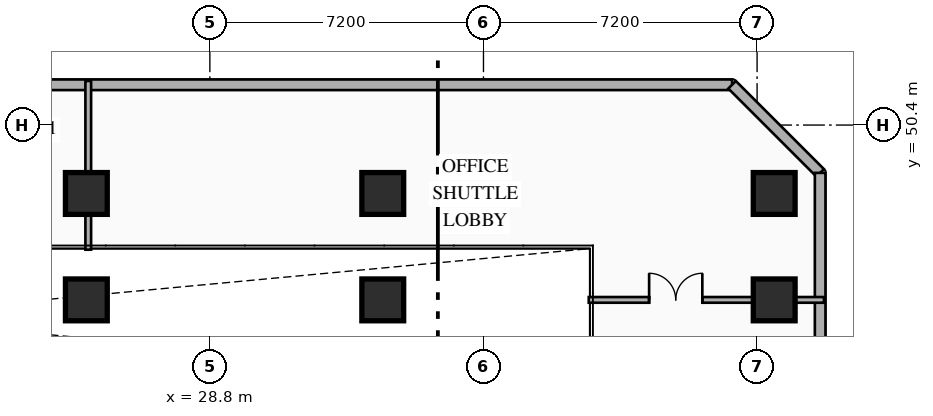
"""IFC4 building model, lengths in metres.
Left out: names, types, materials, properties, quantities, classifications, styles, units other than length and angle.
Written with IfcOpenShell. Run it as: python <this file> out.ifc"""

import sys

from ifc_helpers import new_model, si_unit, direction, frame, frame_2d, origin, origin_2d, place, context, subcontext, project, spatial, rectangle, hollow_rectangle, extrude, element, fill, save


model = new_model("IFC4")
c1 = context("Model", 3, precision=1e-05, world=origin(), true_north=direction((0.0, 1.0)))
c2 = subcontext(c1, "Body", "Model", "MODEL_VIEW")
j1 = project(units=[si_unit("LENGTHUNIT", "METRE"), si_unit("PLANEANGLEUNIT", "RADIAN")], contexts=[c1])
p1 = place(None, origin())
s1 = spatial("IfcSite", under=j1, at=p1, CompositionType="ELEMENT")
p2 = place(p1, origin())
s2 = spatial("IfcBuilding", under=s1, at=p2, CompositionType="ELEMENT")
p3 = place(p2, origin())
s3 = spatial("IfcBuildingStorey", under=s2, at=p3, CompositionType="ELEMENT", Elevation=0.0)
for number, where, z_axis, x_axis in (
    (1, (25.55, 45.8, 0.0), (0.0, 0.0, 1.0), (1.0, 0.0, 0.0)),
    (2, (33.35, 45.8, 0.0), (0.0, 0.0, 1.0), (1.0, 0.0, 0.0)),
    (3, (43.65, 45.8, 0.0), (0.0, 0.0, 1.0), (1.0, 0.0, 0.0)),
    (4, (25.55, 48.6, 0.0), (0.0, 0.0, 1.0), (1.0, 0.0, 0.0)),
    (5, (33.35, 48.6, 0.0), (0.0, 0.0, 1.0), (1.0, 0.0, 0.0)),
    (6, (43.65, 48.6, 0.0), (0.0, 0.0, 1.0), (1.0, 0.0, 0.0)),
):
    element("IfcColumn", number, at=place(p3, frame(where, z_axis=z_axis, x_axis=x_axis)), inside=s3, PredefinedType="COLUMN", context=c2, shape_type="SweptSolid", body=[
        extrude(hollow_rectangle(XDim=1.1, YDim=1.1, WallThickness=0.04, at=origin_2d()), origin(), (0.0, 0.0, 1.0), 5.4),
    ])
p4 = place(p3, frame((2.458, 51.46, 0.0), z_axis=(0.0, 0.0, 1.0), x_axis=(1.0, 0.0, 0.0)))
e7 = element("IfcWall", 7, at=p4, inside=s3, PredefinedType="STANDARD", context=c2, shape_type="SweptSolid", body=[
    extrude(rectangle(XDim=40.084, YDim=0.28, at=frame_2d((20.042, 0.0))), origin(), (0.0, 0.0, 1.0), 5.1),
])
p5 = place(p4, frame((19.644, 0.0, 0.0)))
e8 = element("IfcOpeningElement", 8, at=p5, cuts=e7, PredefinedType="OPENING", context=c2, shape_type="SweptSolid", body=[
    extrude(rectangle(XDim=2.4, YDim=2.5, at=frame_2d((1.2, 1.25))), frame((0.0, 0.15, 0.0), z_axis=(0.0, -1.0, 0.0), x_axis=(1.0, 0.0, 0.0)), (0.0, 0.0, 1.0), 0.3),
])
p6 = place(p3, frame((42.542, 51.46, 0.0), z_axis=(0.0, 0.0, 1.0), x_axis=(0.707144017911, -0.707069542501, 0.0)))
e9 = element("IfcWall", 9, at=p6, inside=s3, PredefinedType="STANDARD", context=c2, shape_type="SweptSolid", body=[
    extrude(rectangle(XDim=3.278, YDim=0.28, at=frame_2d((1.639, 0.0))), origin(), (0.0, 0.0, 1.0), 5.1),
])
p7 = place(p3, frame((44.86, 49.142, 0.0), z_axis=(0.0, 0.0, 1.0), x_axis=(0.0, -1.0, 0.0)))
e10 = element("IfcWall", 10, at=p7, inside=s3, PredefinedType="STANDARD", context=c2, shape_type="SweptSolid", body=[
    extrude(rectangle(XDim=8.412, YDim=0.28, at=frame_2d((4.206, 0.0))), origin(), (0.0, 0.0, 1.0), 5.1),
])
p8 = place(p3, frame((38.77, 45.8, 0.0), z_axis=(0.0, 0.0, 1.0), x_axis=(1.0, 0.0, 0.0)))
e11 = element("IfcWall", 11, at=p8, inside=s3, PredefinedType="PARTITIONING", context=c2, shape_type="SweptSolid", body=[
    extrude(rectangle(XDim=6.19, YDim=0.15, at=frame_2d((3.095, 0.0))), origin(), (0.0, 0.0, 1.0), 3.895),
])
p9 = place(p8, frame((1.589, 0.0, 0.0)))
e12 = element("IfcOpeningElement", 12, at=p9, cuts=e11, PredefinedType="OPENING", context=c2, shape_type="SweptSolid", body=[
    extrude(rectangle(XDim=1.4, YDim=2.3, at=frame_2d((0.7, 1.15))), frame((0.0, 0.085, 0.0), z_axis=(0.0, -1.0, 0.0), x_axis=(1.0, 0.0, 0.0)), (0.0, 0.0, 1.0), 0.17),
])
p10 = place(p3, frame((25.6, 47.12, 0.0), z_axis=(0.0, 0.0, 1.0), x_axis=(0.0, 1.0, 0.0)))
e13 = element("IfcWall", 13, at=p10, inside=s3, PredefinedType="PARTITIONING", context=c2, shape_type="SweptSolid", body=[
    extrude(rectangle(XDim=4.44, YDim=0.15, at=frame_2d((2.22, 0.0))), origin(), (0.0, 0.0, 1.0), 3.895),
])
p11 = place(p9, origin())
e14 = element("IfcDoor", 14, at=p11, inside=s3, OperationType="DOUBLE_DOOR_SINGLE_SWING", PredefinedType="DOOR", context=c2, shape_type="SweptSolid", body=[
    extrude(rectangle(XDim=1.4, YDim=2.3, at=frame_2d((0.7, 1.15))), frame((0.0, 0.025, 0.0), z_axis=(0.0, -1.0, 0.0), x_axis=(1.0, 0.0, 0.0)), (0.0, 0.0, 1.0), 0.05),
])
fill(e12, e14)
save(model, sys.argv[1])
